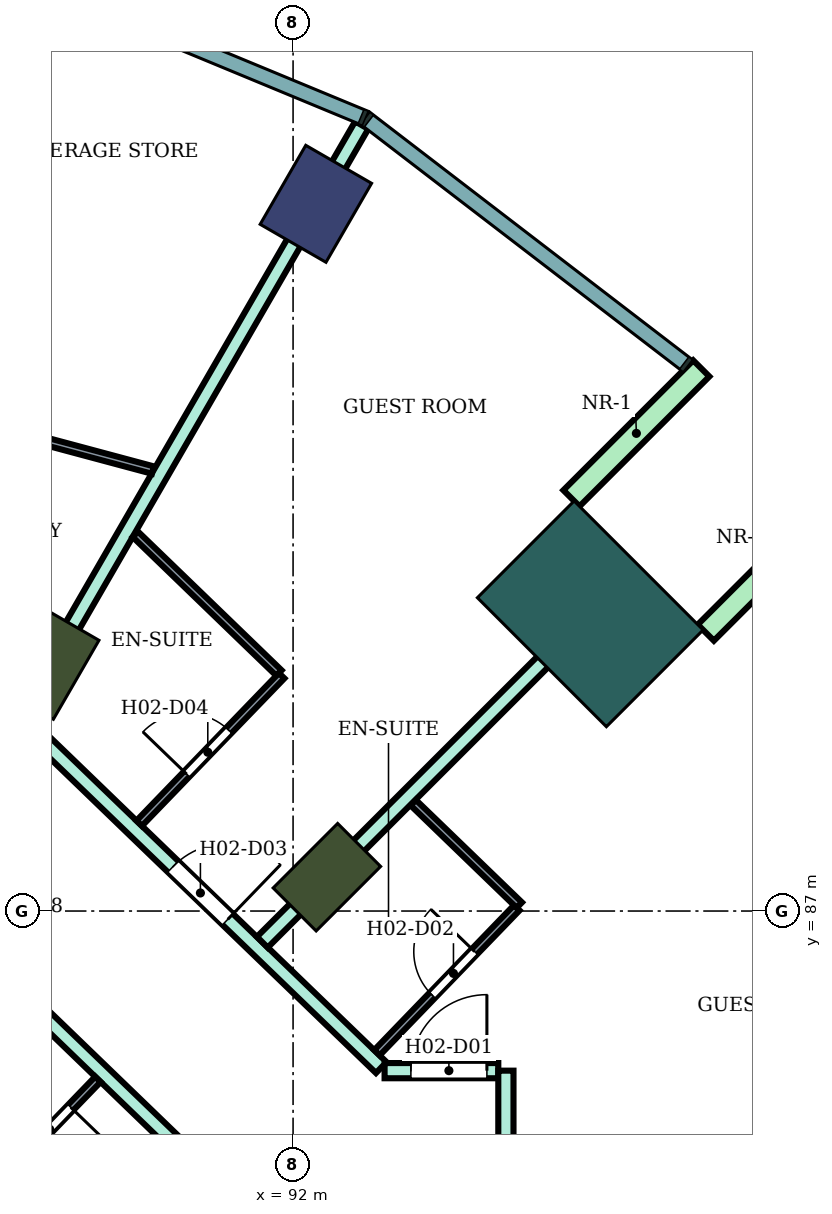
"""IFC4 building model, lengths in metres.
Left out: names, types, materials, properties, quantities, classifications, styles, units other than length and angle.
Written with IfcOpenShell. Run it as: python <this file> out.ifc"""

import sys

from ifc_helpers import new_model, si_unit, direction, frame, frame_2d, origin, origin_2d, place, context, subcontext, project, spatial, rectangle, extrude, element, fill, save


model = new_model("IFC4")
c1 = context("Model", 3, precision=1e-05, world=origin(), true_north=direction((0.0, 1.0)))
c2 = subcontext(c1, "Body", "Model", "MODEL_VIEW")
j1 = project(units=[si_unit("LENGTHUNIT", "METRE"), si_unit("PLANEANGLEUNIT", "RADIAN")], contexts=[c1])
p1 = place(None, origin())
s1 = spatial("IfcSite", under=j1, at=p1, CompositionType="ELEMENT")
p2 = place(p1, origin())
s2 = spatial("IfcBuilding", under=s1, at=p2, CompositionType="ELEMENT")
p3 = place(p2, frame((0.0, 0.0, 40.2)))
s3 = spatial("IfcBuildingStorey", under=s2, at=p3, CompositionType="ELEMENT", Elevation=40.2)
p4 = place(p3, frame((92.3, 96.304, 0.0), z_axis=(0.0, 0.0, 1.0), x_axis=(0.5, 0.866025403784, 0.0)))
e1 = element("IfcColumn", 1, at=p4, inside=s3, PredefinedType="COLUMN", context=c2, shape_type="SweptSolid", body=[
    extrude(rectangle(XDim=1.2, YDim=1.0, at=origin_2d()), origin(), (0.0, 0.0, 1.0), 3.8),
])
for number, where, z_axis, x_axis in (
    (2, (92.445, 87.445, 0.0), (0.0, 0.0, 1.0), (0.707, 0.707, 0.0)),
    (3, (88.8, 90.242, 0.0), (0.0, 0.0, 1.0), (0.5, 0.866, 0.0)),
):
    element("IfcColumn", number, at=place(p3, frame(where, z_axis=z_axis, x_axis=x_axis)), inside=s3, PredefinedType="COLUMN", context=c2, shape_type="SweptSolid", body=[
        extrude(rectangle(XDim=1.2, YDim=0.8, at=origin_2d()), origin(), (0.0, 0.0, 1.0), 3.8),
    ])
p5 = place(p3, frame((95.91, 90.91, 0.0), z_axis=(0.0, 0.0, 1.0), x_axis=(0.707106781187, 0.707106781187, 0.0)))
e4 = element("IfcColumn", 4, at=p5, inside=s3, PredefinedType="COLUMN", context=c2, shape_type="SweptSolid", body=[
    extrude(rectangle(XDim=1.8, YDim=2.4, at=origin_2d()), origin(), (0.0, 0.0, 1.0), 3.8),
])
for number, where, z_axis, x_axis in (
    (5, (97.43, 90.662, 0.0), (0.0, 0.0, 1.0), (0.707, 0.707, 0.0)),
    (6, (95.662, 92.43, 0.0), (0.0, 0.0, 1.0), (0.707, 0.707, 0.0)),
):
    element("IfcWall", number, at=place(p3, frame(where, z_axis=z_axis, x_axis=x_axis)), inside=s3, PredefinedType="NOTDEFINED", context=c2, shape_type="SweptSolid", body=[
        extrude(rectangle(XDim=2.416, YDim=0.3, at=frame_2d((1.208, 0.0))), origin(), (0.0, 0.0, 1.0), 3.8),
    ])
p6 = place(p3, frame((87.064, 87.211, 0.0), z_axis=(0.0, 0.0, 1.0), x_axis=(0.719540958932, -0.694450004262, 0.0)))
e7 = element("IfcWall", 7, at=p6, inside=s3, PredefinedType="PARTITIONING", context=c2, shape_type="SweptSolid", body=[
    extrude(rectangle(XDim=5.488, YDim=0.2, at=frame_2d((2.744, 0.0))), origin(), (0.0, 0.0, 1.0), 3.35),
])
p7 = place(p6, frame((0.55, 0.0, 0.0)))
e8 = element("IfcOpeningElement", 8, at=p7, cuts=e7, PredefinedType="OPENING", context=c2, shape_type="SweptSolid", body=[
    extrude(rectangle(XDim=1.0, YDim=2.1, at=frame_2d((0.5, 1.05))), frame((0.0, 0.11, 0.0), z_axis=(0.0, -1.0, 0.0), x_axis=(1.0, 0.0, 0.0)), (0.0, 0.0, 1.0), 0.22),
])
p8 = place(p3, frame((88.465, 89.473, 0.0), z_axis=(0.0, 0.0, 1.0), x_axis=(0.719474304909, -0.694519059908, 0.0)))
e9 = element("IfcWall", 9, at=p8, inside=s3, PredefinedType="PARTITIONING", context=c2, shape_type="SweptSolid", body=[
    extrude(rectangle(XDim=6.525, YDim=0.2, at=frame_2d((3.263, 0.0))), origin(), (0.0, 0.0, 1.0), 3.35),
])
p9 = place(p8, frame((2.719, 0.0, 0.0)))
e10 = element("IfcOpeningElement", 10, at=p9, cuts=e9, PredefinedType="OPENING", context=c2, shape_type="SweptSolid", body=[
    extrude(rectangle(XDim=1.0, YDim=2.1, at=frame_2d((0.5, 1.05))), frame((0.0, 0.11, 0.0), z_axis=(0.0, -1.0, 0.0), x_axis=(1.0, 0.0, 0.0)), (0.0, 0.0, 1.0), 0.22),
])
p10 = place(p3, frame((88.397, 89.539, 0.0), z_axis=(0.0, 0.0, 1.0), x_axis=(0.500228379329, 0.86589350876, 0.0)))
e11 = element("IfcWall", 11, at=p10, inside=s3, PredefinedType="PARTITIONING", context=c2, shape_type="SweptSolid", body=[
    extrude(rectangle(XDim=9.008, YDim=0.2, at=frame_2d((4.504, 0.0))), origin(), (0.0, 0.0, 1.0), 3.35),
])
p11 = place(p3, frame((91.595, 86.59, 0.0), z_axis=(0.0, 0.0, 1.0), x_axis=(0.707232337591, 0.706981202484, 0.0)))
e12 = element("IfcWall", 12, at=p11, inside=s3, PredefinedType="PARTITIONING", context=c2, shape_type="SweptSolid", body=[
    extrude(rectangle(XDim=6.805, YDim=0.2, at=frame_2d((3.402, 0.0))), origin(), (0.0, 0.0, 1.0), 3.35),
])
p12 = place(p3, frame((93.204, 84.9, 0.0), z_axis=(0.0, 0.0, 1.0), x_axis=(1.0, 0.0, 0.0)))
e13 = element("IfcWall", 13, at=p12, inside=s3, PredefinedType="PARTITIONING", context=c2, shape_type="SweptSolid", body=[
    extrude(rectangle(XDim=1.496, YDim=0.2, at=frame_2d((0.748, 0.0))), origin(), (0.0, 0.0, 1.0), 3.35),
])
p13 = place(p12, frame((0.346, 0.0, 0.0)))
e14 = element("IfcOpeningElement", 14, at=p13, cuts=e13, PredefinedType="OPENING", context=c2, shape_type="SweptSolid", body=[
    extrude(rectangle(XDim=1.0, YDim=2.1, at=frame_2d((0.5, 1.05))), frame((0.0, 0.11, 0.0), z_axis=(0.0, -1.0, 0.0), x_axis=(1.0, 0.0, 0.0)), (0.0, 0.0, 1.0), 0.22),
])
p14 = place(p3, frame((94.8, 83.401, 0.0), z_axis=(0.0, 0.0, 1.0), x_axis=(0.0, 1.0, 0.0)))
e15 = element("IfcWall", 15, at=p14, inside=s3, PredefinedType="PARTITIONING", context=c2, shape_type="SweptSolid", body=[
    extrude(rectangle(XDim=1.499, YDim=0.2, at=frame_2d((0.75, 0.0))), origin(), (0.0, 0.0, 1.0), 3.35),
])
p15 = place(p3, frame((85.237, 94.119, 0.0), z_axis=(0.0, 0.0, 1.0), x_axis=(0.965923866142, -0.258826360359, 0.0)))
e16 = element("IfcWall", 16, at=p15, inside=s3, PredefinedType="PARTITIONING", context=c2, shape_type="SweptSolid", body=[
    extrude(rectangle(XDim=5.092, YDim=0.1, at=frame_2d((2.546, 0.0))), origin(), (0.0, 0.0, 1.0), 3.35),
])
p16 = place(p15, frame((2.096, 0.0, 0.0)))
e17 = element("IfcOpeningElement", 17, at=p16, cuts=e16, PredefinedType="OPENING", context=c2, shape_type="SweptSolid", body=[
    extrude(rectangle(XDim=0.9, YDim=2.1, at=frame_2d((0.45, 1.05))), frame((0.0, 0.06, 0.0), z_axis=(0.0, -1.0, 0.0), x_axis=(1.0, 0.0, 0.0)), (0.0, 0.0, 1.0), 0.12),
])
p17 = place(p3, frame((88.095, 83.4, 0.0), z_axis=(0.0, 0.0, 1.0), x_axis=(0.694447472534, 0.719543402368, 0.0)))
e18 = element("IfcWall", 18, at=p17, inside=s3, PredefinedType="PARTITIONING", context=c2, shape_type="SweptSolid", body=[
    extrude(rectangle(XDim=1.926, YDim=0.1, at=frame_2d((0.963, 0.0))), origin(), (0.0, 0.0, 1.0), 3.35),
])
p18 = place(p17, frame((0.613, 0.0, 0.0)))
e19 = element("IfcOpeningElement", 19, at=p18, cuts=e18, PredefinedType="OPENING", context=c2, shape_type="SweptSolid", body=[
    extrude(rectangle(XDim=0.8, YDim=2.1, at=frame_2d((0.4, 1.05))), frame((0.0, 0.06, 0.0), z_axis=(0.0, -1.0, 0.0), x_axis=(1.0, 0.0, 0.0)), (0.0, 0.0, 1.0), 0.12),
])
p19 = place(p3, frame((89.925, 91.956, 0.0), z_axis=(0.0, 0.0, 1.0), x_axis=(0.71931338148, -0.694685726947, 0.0)))
e20 = element("IfcWall", 20, at=p19, inside=s3, PredefinedType="PARTITIONING", context=c2, shape_type="SweptSolid", body=[
    extrude(rectangle(XDim=2.627, YDim=0.1, at=frame_2d((1.313, 0.0))), origin(), (0.0, 0.0, 1.0), 3.35),
])
p20 = place(p3, frame((89.976, 88.154, 0.0), z_axis=(0.0, 0.0, 1.0), x_axis=(0.6945137956, 0.719479386585, 0.0)))
e21 = element("IfcWall", 21, at=p20, inside=s3, PredefinedType="PARTITIONING", context=c2, shape_type="SweptSolid", body=[
    extrude(rectangle(XDim=2.699, YDim=0.1, at=frame_2d((1.35, 0.0))), origin(), (0.0, 0.0, 1.0), 3.35),
])
p21 = place(p20, frame((0.9, 0.0, 0.0)))
e22 = element("IfcOpeningElement", 22, at=p21, cuts=e21, PredefinedType="OPENING", context=c2, shape_type="SweptSolid", body=[
    extrude(rectangle(XDim=0.8, YDim=2.1, at=frame_2d((0.4, 1.05))), frame((0.0, 0.06, 0.0), z_axis=(0.0, -1.0, 0.0), x_axis=(1.0, 0.0, 0.0)), (0.0, 0.0, 1.0), 0.12),
])
p22 = place(p3, frame((93.104, 85.136, 0.0), z_axis=(0.0, 0.0, 1.0), x_axis=(0.694324808789, 0.719661767708, 0.0)))
e23 = element("IfcWall", 23, at=p22, inside=s3, PredefinedType="PARTITIONING", context=c2, shape_type="SweptSolid", body=[
    extrude(rectangle(XDim=2.65, YDim=0.1, at=frame_2d((1.325, 0.0))), origin(), (0.0, 0.0, 1.0), 3.35),
])
p23 = place(p22, frame((1.05, 0.0, 0.0)))
e24 = element("IfcOpeningElement", 24, at=p23, cuts=e23, PredefinedType="OPENING", context=c2, shape_type="SweptSolid", body=[
    extrude(rectangle(XDim=0.8, YDim=2.1, at=frame_2d((0.4, 1.05))), frame((0.0, 0.06, 0.0), z_axis=(0.0, -1.0, 0.0), x_axis=(1.0, 0.0, 0.0)), (0.0, 0.0, 1.0), 0.12),
])
p24 = place(p3, frame((93.582, 88.425, 0.0), z_axis=(0.0, 0.0, 1.0), x_axis=(0.719334224501, -0.694664144361, 0.0)))
e25 = element("IfcWall", 25, at=p24, inside=s3, PredefinedType="PARTITIONING", context=c2, shape_type="SweptSolid", body=[
    extrude(rectangle(XDim=1.94, YDim=0.1, at=frame_2d((0.97, 0.0))), origin(), (0.0, 0.0, 1.0), 3.35),
])
p25 = place(p13, origin())
e26 = element("IfcDoor", 26, at=p25, inside=s3, OperationType="SINGLE_SWING_RIGHT", PredefinedType="DOOR", context=c2, shape_type="SweptSolid", body=[
    extrude(rectangle(XDim=1.0, YDim=2.1, at=frame_2d((0.5, 1.05))), frame((0.0, 0.025, 0.0), z_axis=(0.0, -1.0, 0.0), x_axis=(1.0, 0.0, 0.0)), (0.0, 0.0, 1.0), 0.05),
])
fill(e14, e26)
p26 = place(p23, origin())
e27 = element("IfcDoor", 27, at=p26, inside=s3, OperationType="SINGLE_SWING_RIGHT", PredefinedType="DOOR", context=c2, shape_type="SweptSolid", body=[
    extrude(rectangle(XDim=0.8, YDim=2.1, at=frame_2d((0.4, 1.05))), frame((0.0, 0.025, 0.0), z_axis=(0.0, -1.0, 0.0), x_axis=(1.0, 0.0, 0.0)), (0.0, 0.0, 1.0), 0.05),
])
fill(e24, e27)
p27 = place(p9, origin())
e28 = element("IfcDoor", 28, at=p27, inside=s3, OperationType="SINGLE_SWING_RIGHT", PredefinedType="DOOR", context=c2, shape_type="SweptSolid", body=[
    extrude(rectangle(XDim=1.0, YDim=2.1, at=frame_2d((0.5, 1.05))), frame((0.0, 0.025, 0.0), z_axis=(0.0, -1.0, 0.0), x_axis=(1.0, 0.0, 0.0)), (0.0, 0.0, 1.0), 0.05),
])
fill(e10, e28)
p28 = place(p21, origin())
e29 = element("IfcDoor", 29, at=p28, inside=s3, OperationType="SINGLE_SWING_LEFT", PredefinedType="DOOR", context=c2, shape_type="SweptSolid", body=[
    extrude(rectangle(XDim=0.8, YDim=2.1, at=frame_2d((0.4, 1.05))), frame((0.0, 0.025, 0.0), z_axis=(0.0, -1.0, 0.0), x_axis=(1.0, 0.0, 0.0)), (0.0, 0.0, 1.0), 0.05),
])
fill(e22, e29)
p29 = place(p18, frame((0.8, 0.0, 0.0), z_axis=(0.0, 0.0, 1.0), x_axis=(-1.0, 0.0, 0.0)))
e30 = element("IfcDoor", 30, at=p29, inside=s3, OperationType="SINGLE_SWING_LEFT", PredefinedType="DOOR", context=c2, shape_type="SweptSolid", body=[
    extrude(rectangle(XDim=0.8, YDim=2.1, at=frame_2d((0.4, 1.05))), frame((0.0, 0.025, 0.0), z_axis=(0.0, -1.0, 0.0), x_axis=(1.0, 0.0, 0.0)), (0.0, 0.0, 1.0), 0.05),
])
fill(e19, e30)
save(model, sys.argv[1])
